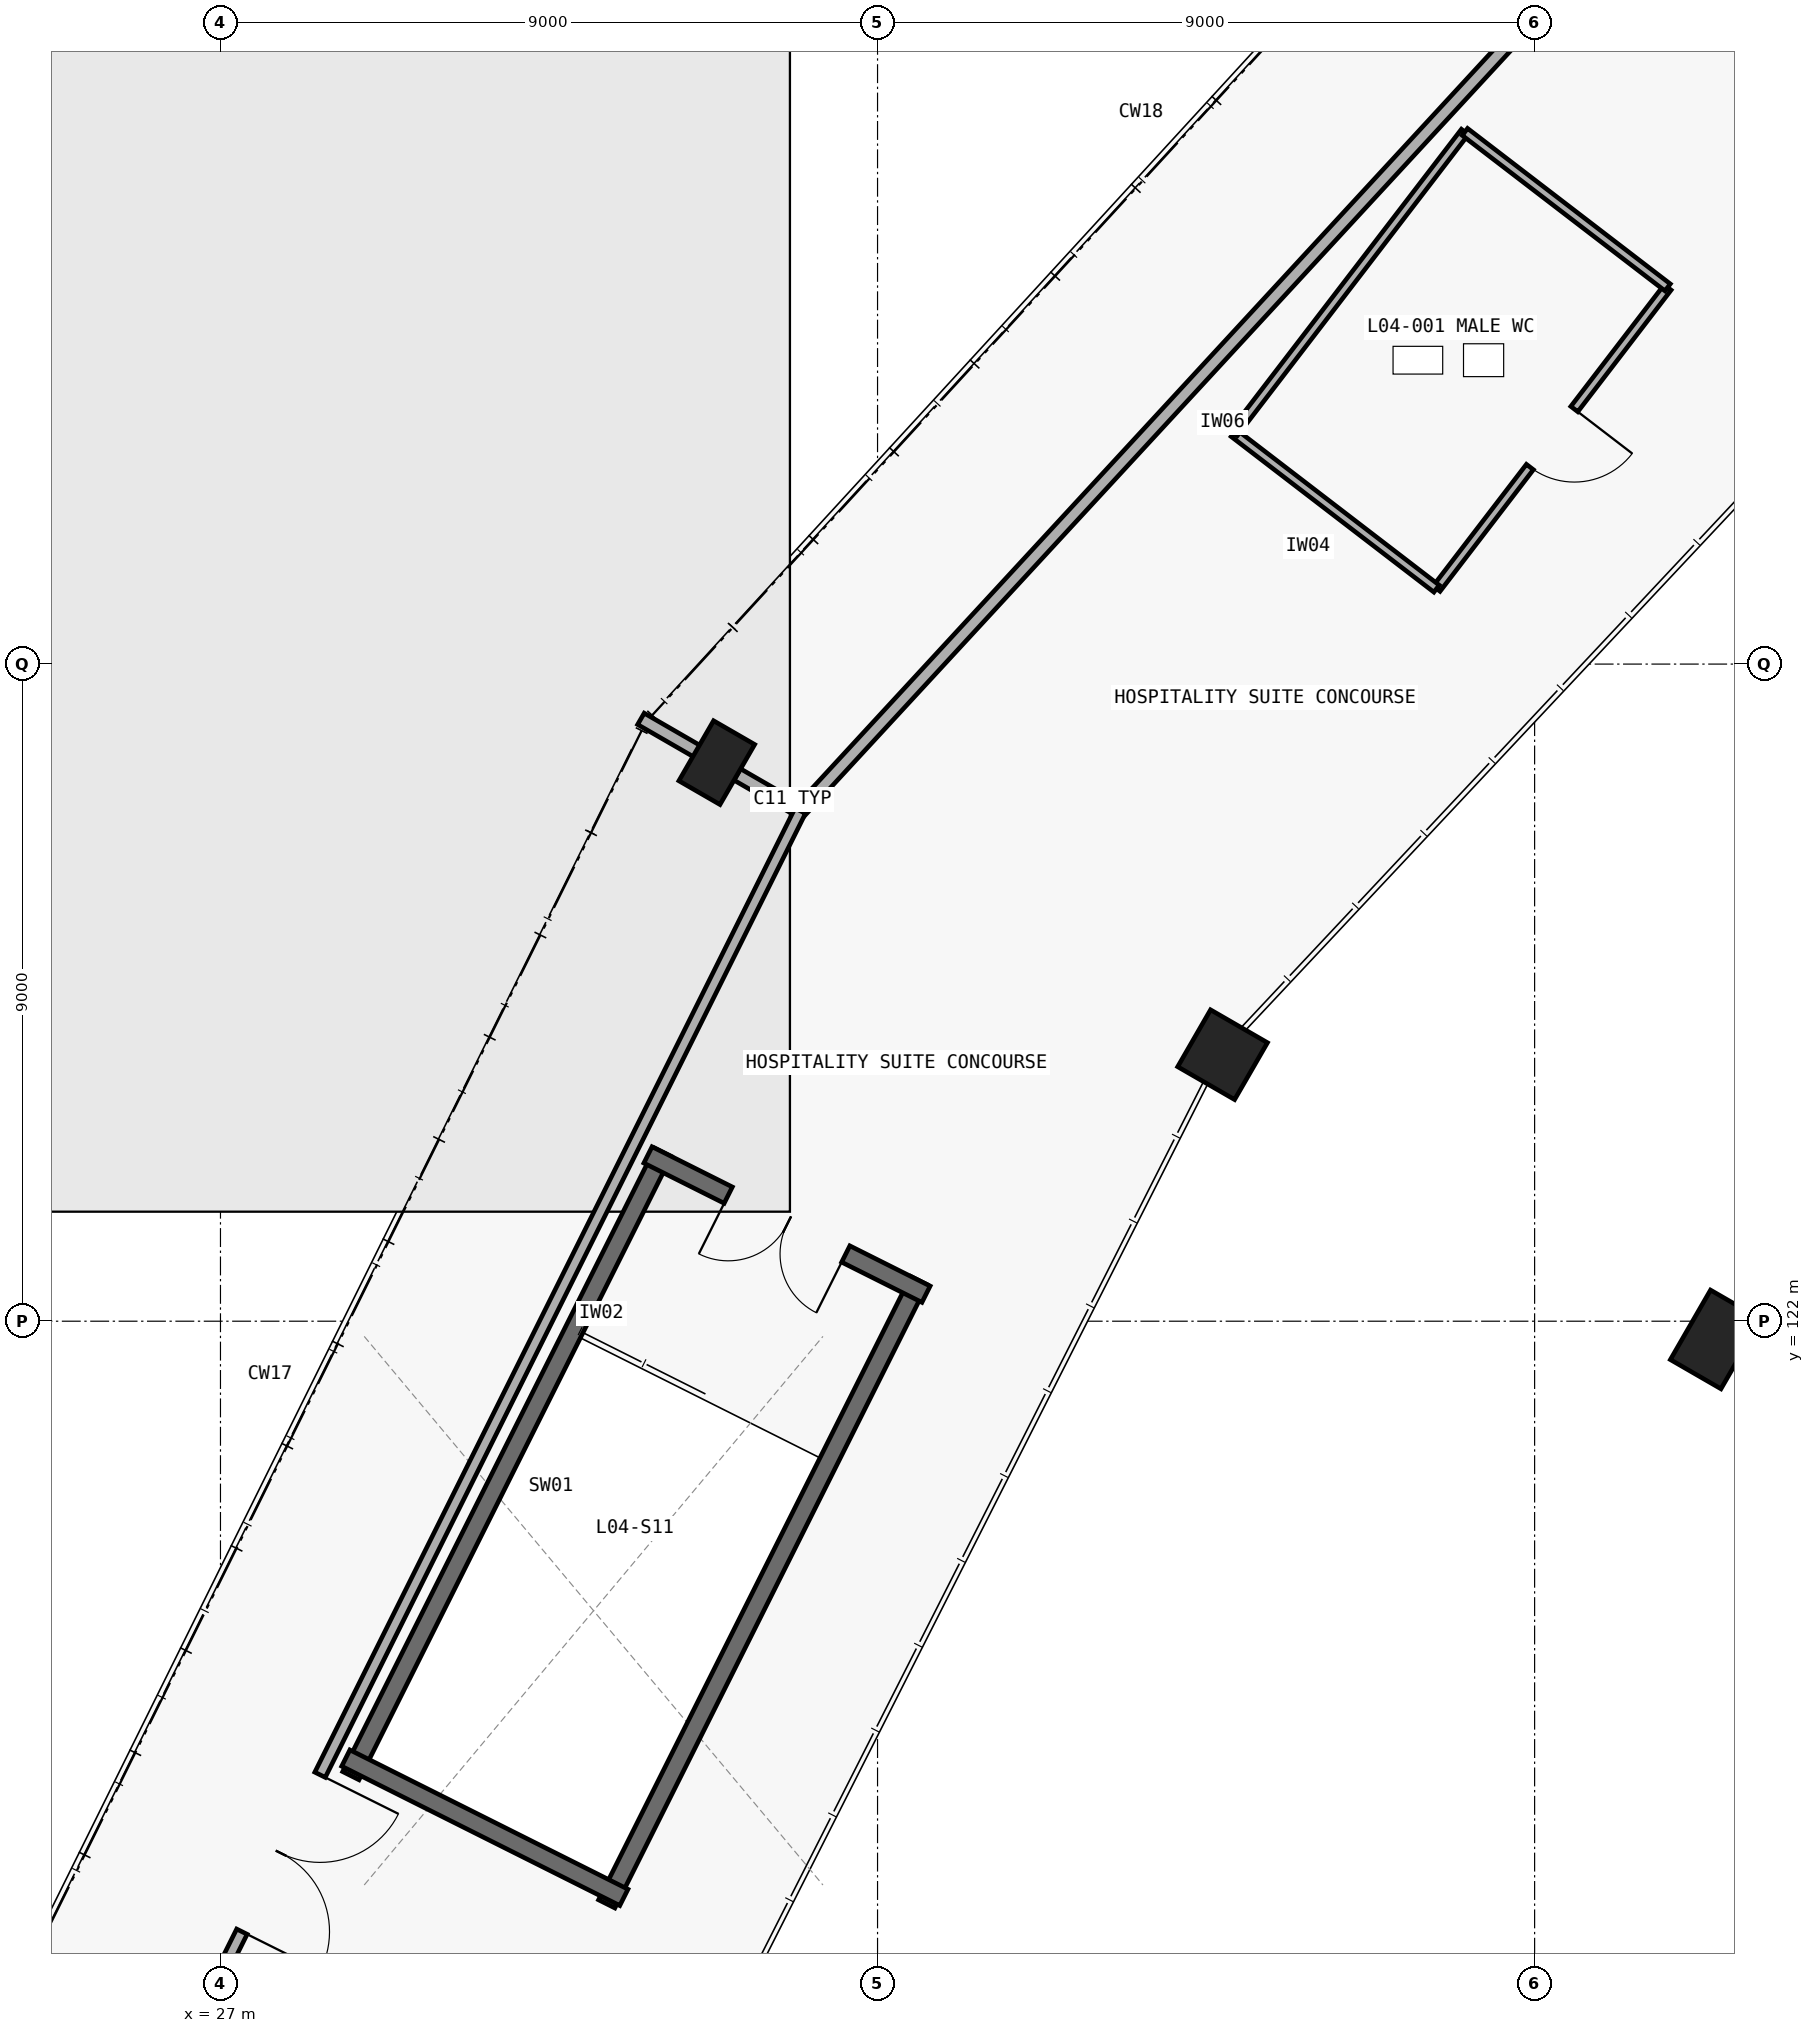
"""IFC4 building model, lengths in metres.
Left out: names, types, materials, properties, quantities, classifications, styles, units other than length and angle.
Written with IfcOpenShell. Run it as: python <this file> out.ifc"""

import sys

from ifc_helpers import new_model, si_unit, direction, frame, frame_2d, origin, origin_2d, place, context, subcontext, project, spatial, rectangle, extrude, element, fill, save


model = new_model("IFC4")
c1 = context("Model", 3, precision=1e-05, world=origin(), true_north=direction((0.0, 1.0)))
c2 = subcontext(c1, "Body", "Model", "MODEL_VIEW")
j1 = project(units=[si_unit("LENGTHUNIT", "METRE"), si_unit("PLANEANGLEUNIT", "RADIAN")], contexts=[c1])
p1 = place(None, origin())
s1 = spatial("IfcSite", under=j1, at=p1, CompositionType="ELEMENT")
p2 = place(p1, origin())
s2 = spatial("IfcBuilding", under=s1, at=p2, CompositionType="ELEMENT")
p3 = place(p2, frame((0.0, 0.0, 19.8)))
s3 = spatial("IfcBuildingStorey", under=s2, at=p3, CompositionType="ELEMENT", Elevation=19.8)
p4 = place(p3, frame((47.481, 121.75, 0.0), z_axis=(0.0, 0.0, 1.0), x_axis=(-0.866025403784, 0.5, 0.0)))
e1 = element("IfcColumn", 1, at=p4, inside=s3, PredefinedType="COLUMN", context=c2, shape_type="SweptSolid", body=[
    extrude(rectangle(XDim=0.8, YDim=1.1, at=origin_2d()), origin(), (0.0, 0.0, 1.0), 4.8),
])
p5 = place(p3, frame((33.798, 129.65, 0.0), z_axis=(0.0, 0.0, 1.0), x_axis=(-0.866025403784, 0.5, 0.0)))
e2 = element("IfcColumn", 2, at=p5, inside=s3, PredefinedType="COLUMN", context=c2, shape_type="SweptSolid", body=[
    extrude(rectangle(XDim=0.65, YDim=0.95, at=origin_2d()), origin(), (0.0, 0.0, 1.0), 4.8),
])
p6 = place(p3, frame((40.726, 125.65, 0.0), z_axis=(0.0, 0.0, 1.0), x_axis=(-0.866025403784, 0.5, 0.0)))
e3 = element("IfcColumn", 3, at=p6, inside=s3, PredefinedType="COLUMN", context=c2, shape_type="SweptSolid", body=[
    extrude(rectangle(XDim=0.9, YDim=0.9, at=origin_2d()), origin(), (0.0, 0.0, 1.0), 4.8),
])
p7 = place(p3, frame((33.063, 124.313, 0.0), z_axis=(0.0, 0.0, 1.0), x_axis=(-0.447919041961, -0.894074119885, 0.0)))
e4 = element("IfcWall", 4, at=p7, inside=s3, PredefinedType="SHEAR", context=c2, shape_type="SweptSolid", body=[
    extrude(rectangle(XDim=9.55, YDim=0.25, at=frame_2d((4.775, 0.0))), origin(), (0.0, 0.0, 1.0), 4.54),
])
p8 = place(p3, frame((32.291, 114.019, 0.0), z_axis=(0.0, 0.0, 1.0), x_axis=(0.4479088042, 0.894079248792, 0.0)))
e5 = element("IfcWall", 5, at=p8, inside=s3, PredefinedType="SHEAR", context=c2, shape_type="SweptSolid", body=[
    extrude(rectangle(XDim=9.55, YDim=0.25, at=frame_2d((4.775, 0.0))), origin(), (0.0, 0.0, 1.0), 4.54),
])
p9 = place(p3, frame((36.664, 122.37, 0.0), z_axis=(0.0, 0.0, 1.0), x_axis=(-0.894071595331, 0.447924081092, 0.0)))
e6 = element("IfcWall", 6, at=p9, inside=s3, PredefinedType="SHEAR", context=c2, shape_type="SweptSolid", body=[
    extrude(rectangle(XDim=4.26, YDim=0.25, at=frame_2d((2.13, 0.0))), origin(), (0.0, 0.0, 1.0), 4.54),
])
p10 = place(p9, frame((1.23, 0.0, 0.0)))
e7 = element("IfcOpeningElement", 7, at=p10, cuts=e6, PredefinedType="OPENING", context=c2, shape_type="SweptSolid", body=[
    extrude(rectangle(XDim=1.8, YDim=2.25, at=frame_2d((0.9, 1.125))), frame((0.0, 0.135, 0.0), z_axis=(0.0, -1.0, 0.0), x_axis=(1.0, 0.0, 0.0)), (0.0, 0.0, 1.0), 0.27),
])
p11 = place(p3, frame((28.717, 116.016, 0.0), z_axis=(0.0, 0.0, 1.0), x_axis=(0.894083048484, -0.447901219481, 0.0)))
e8 = element("IfcWall", 8, at=p11, inside=s3, PredefinedType="SHEAR", context=c2, shape_type="SweptSolid", body=[
    extrude(rectangle(XDim=4.26, YDim=0.25, at=frame_2d((2.13, 0.0))), origin(), (0.0, 0.0, 1.0), 4.54),
])
p12 = place(p3, frame((46.822, 136.159, 0.0), z_axis=(0.0, 0.0, 1.0), x_axis=(-0.608648360817, -0.793440087767, 0.0)))
e9 = element("IfcWall", 9, at=p12, inside=s3, PredefinedType="PARTITIONING", context=c2, shape_type="SweptSolid", body=[
    extrude(rectangle(XDim=5.2, YDim=0.12, at=frame_2d((2.6, 0.0))), origin(), (0.0, 0.0, 1.0), 4.52),
])
p13 = place(p12, frame((2.1, 0.0, 0.0)))
e10 = element("IfcOpeningElement", 10, at=p13, cuts=e9, PredefinedType="OPENING", context=c2, shape_type="SweptSolid", body=[
    extrude(rectangle(XDim=1.0, YDim=2.1, at=frame_2d((0.5, 1.05))), frame((0.0, 0.07, 0.0), z_axis=(0.0, -1.0, 0.0), x_axis=(1.0, 0.0, 0.0)), (0.0, 0.0, 1.0), 0.14),
])
p14 = place(p3, frame((43.657, 132.033, 0.0), z_axis=(0.0, 0.0, 1.0), x_axis=(-0.793331259853, 0.608790203715, 0.0)))
e11 = element("IfcWall", 11, at=p14, inside=s3, PredefinedType="PARTITIONING", context=c2, shape_type="SweptSolid", body=[
    extrude(rectangle(XDim=3.5, YDim=0.12, at=frame_2d((1.75, 0.0))), origin(), (0.0, 0.0, 1.0), 4.52),
])
p15 = place(p3, frame((40.88, 134.164, 0.0), z_axis=(0.0, 0.0, 1.0), x_axis=(0.608739062155, 0.793370502481, 0.0)))
e12 = element("IfcWall", 12, at=p15, inside=s3, PredefinedType="PARTITIONING", context=c2, shape_type="SweptSolid", body=[
    extrude(rectangle(XDim=5.199, YDim=0.12, at=frame_2d((2.6, 0.0))), origin(), (0.0, 0.0, 1.0), 4.52),
])
p16 = place(p3, frame((44.045, 138.289, 0.0), z_axis=(0.0, 0.0, 1.0), x_axis=(0.793465999837, -0.608614580094, 0.0)))
e13 = element("IfcWall", 13, at=p16, inside=s3, PredefinedType="PARTITIONING", context=c2, shape_type="SweptSolid", body=[
    extrude(rectangle(XDim=3.5, YDim=0.12, at=frame_2d((1.75, 0.0))), origin(), (0.0, 0.0, 1.0), 4.52),
])
p17 = place(p3, frame((49.082, 144.312, 0.0), z_axis=(0.0, 0.0, 1.0), x_axis=(-0.678220768878, -0.734858209903, 0.0)))
e14 = element("IfcWall", 14, at=p17, inside=s3, PredefinedType="PARTITIONING", context=c2, shape_type="SweptSolid", body=[
    extrude(rectangle(XDim=20.85, YDim=0.18, at=frame_2d((10.425, 0.0))), origin(), (0.0, 0.0, 1.0), 3.665),
])
p18 = place(p17, frame((3.081, 0.0, 0.0)))
e15 = element("IfcOpeningElement", 15, at=p18, cuts=e14, PredefinedType="OPENING", context=c2, shape_type="SweptSolid", body=[
    extrude(rectangle(XDim=2.1, YDim=2.35, at=frame_2d((1.05, 1.175))), frame((0.0, 0.1, 0.0), z_axis=(0.0, -1.0, 0.0), x_axis=(1.0, 0.0, 0.0)), (0.0, 0.0, 1.0), 0.2),
])
p19 = place(p3, frame((34.941, 128.99, 0.0), z_axis=(0.0, 0.0, 1.0), x_axis=(-0.866048774504, 0.499959518541, 0.0)))
e16 = element("IfcWall", 16, at=p19, inside=s3, PredefinedType="PARTITIONING", context=c2, shape_type="SweptSolid", body=[
    extrude(rectangle(XDim=1.01, YDim=0.18, at=frame_2d((0.505, 0.0))), origin(), (0.0, 0.0, 1.0), 3.665),
])
p20 = place(p3, frame((34.079, 129.488, 0.0), z_axis=(0.0, 0.0, 1.0), x_axis=(-0.866076232617, 0.499911951544, 0.0)))
e17 = element("IfcWall", 17, at=p20, inside=s3, PredefinedType="PARTITIONING", context=c2, shape_type="SweptSolid", body=[
    extrude(rectangle(XDim=1.524, YDim=0.18, at=frame_2d((0.762, 0.0))), origin(), (0.0, 0.0, 1.0), 3.665),
])
p21 = place(p3, frame((34.941, 128.99, 0.0), z_axis=(0.0, 0.0, 1.0), x_axis=(-0.44590512567, -0.895080230427, 0.0)))
e18 = element("IfcWall", 18, at=p21, inside=s3, PredefinedType="PARTITIONING", context=c2, shape_type="SweptSolid", body=[
    extrude(rectangle(XDim=19.935, YDim=0.16, at=frame_2d((9.967, 0.0))), origin(), (0.0, 0.0, 1.0), 3.665),
])
p22 = place(p21, frame((14.75, 0.0, 0.0)))
e19 = element("IfcOpeningElement", 19, at=p22, cuts=e18, PredefinedType="OPENING", context=c2, shape_type="SweptSolid", body=[
    extrude(rectangle(XDim=2.4, YDim=2.4, at=frame_2d((1.2, 1.2))), frame((0.0, 0.09, 0.0), z_axis=(0.0, -1.0, 0.0), x_axis=(1.0, 0.0, 0.0)), (0.0, 0.0, 1.0), 0.18),
])
p23 = place(p10, origin())
e20 = element("IfcDoor", 20, at=p23, inside=s3, OperationType="DOUBLE_DOOR_SINGLE_SWING", PredefinedType="DOOR", context=c2, shape_type="SweptSolid", body=[
    extrude(rectangle(XDim=1.8, YDim=2.25, at=frame_2d((0.9, 1.125))), frame((0.0, 0.025, 0.0), z_axis=(0.0, -1.0, 0.0), x_axis=(1.0, 0.0, 0.0)), (0.0, 0.0, 1.0), 0.05),
])
fill(e7, e20)
p24 = place(p13, origin())
e21 = element("IfcDoor", 21, at=p24, inside=s3, OperationType="SINGLE_SWING_LEFT", PredefinedType="DOOR", context=c2, shape_type="SweptSolid", body=[
    extrude(rectangle(XDim=1.0, YDim=2.1, at=frame_2d((0.5, 1.05))), frame((0.0, 0.025, 0.0), z_axis=(0.0, -1.0, 0.0), x_axis=(1.0, 0.0, 0.0)), (0.0, 0.0, 1.0), 0.05),
])
fill(e10, e21)
p25 = place(p22, origin())
e22 = element("IfcDoor", 22, at=p25, inside=s3, OperationType="DOUBLE_DOOR_SINGLE_SWING", PredefinedType="DOOR", context=c2, shape_type="SweptSolid", body=[
    extrude(rectangle(XDim=2.4, YDim=2.4, at=frame_2d((1.2, 1.2))), frame((0.0, 0.025, 0.0), z_axis=(0.0, -1.0, 0.0), x_axis=(1.0, 0.0, 0.0)), (0.0, 0.0, 1.0), 0.05),
])
fill(e19, e22)
save(model, sys.argv[1])
